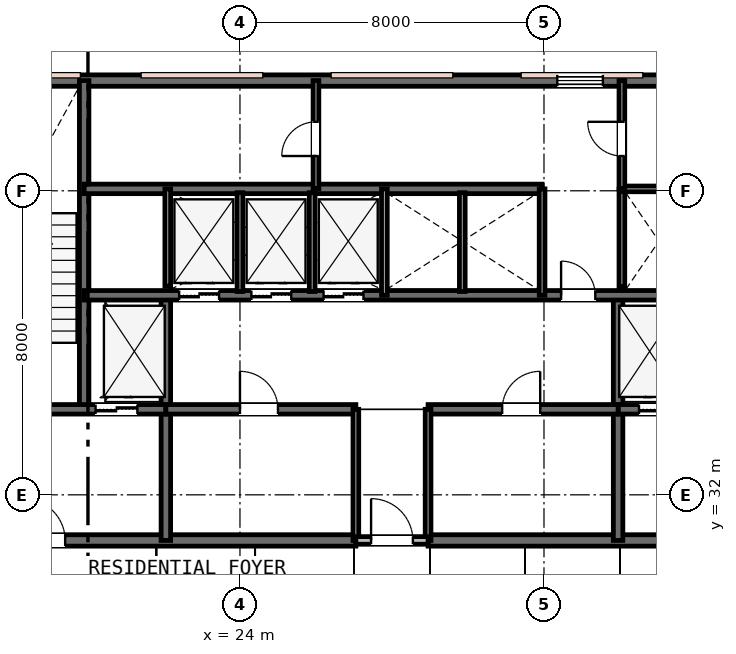
"""IFC4 building model, lengths in metres.
Left out: names, types, materials, properties, quantities, classifications, styles, units other than length and angle.
Written with IfcOpenShell. Run it as: python <this file> out.ifc"""

import sys

from ifc_helpers import new_model, si_unit, direction, frame, frame_2d, origin, place, context, subcontext, project, spatial, rectangle, extrude, element, fill, save


model = new_model("IFC4")
c1 = context("Model", 3, precision=1e-05, world=origin(), true_north=direction((0.0, 1.0)))
c2 = subcontext(c1, "Body", "Model", "MODEL_VIEW")
j1 = project(units=[si_unit("LENGTHUNIT", "METRE"), si_unit("PLANEANGLEUNIT", "RADIAN")], contexts=[c1])
p1 = place(None, origin())
s1 = spatial("IfcSite", under=j1, at=p1, CompositionType="ELEMENT")
p2 = place(p1, origin())
s2 = spatial("IfcBuilding", under=s1, at=p2, CompositionType="ELEMENT")
p3 = place(p2, frame((0.0, 0.0, 275.4)))
s3 = spatial("IfcBuildingStorey", under=s2, at=p3, CompositionType="ELEMENT", Elevation=275.4)
p4 = place(p3, frame((15.85, 42.9, 0.0), z_axis=(0.0, 0.0, 1.0), x_axis=(1.0, 0.0, 0.0)))
e1 = element("IfcWall", 1, at=p4, inside=s3, PredefinedType="SHEAR", context=c2, shape_type="SweptSolid", body=[
    extrude(rectangle(XDim=24.3, YDim=0.3, at=frame_2d((12.15, 0.0))), origin(), (0.0, 0.0, 1.0), 3.8),
])
p5 = place(p4, frame((1.6, 0.0, 0.95)))
e2 = element("IfcOpeningElement", 2, at=p5, cuts=e1, PredefinedType="OPENING", context=c2, shape_type="SweptSolid", body=[
    extrude(rectangle(XDim=1.2, YDim=1.6, at=frame_2d((0.6, 0.8))), frame((0.0, 0.16, 0.0), z_axis=(0.0, -1.0, 0.0), x_axis=(1.0, 0.0, 0.0)), (0.0, 0.0, 1.0), 0.32),
])
p6 = place(p4, frame((16.5, 0.0, 0.95)))
e3 = element("IfcOpeningElement", 3, at=p6, cuts=e1, PredefinedType="OPENING", context=c2, shape_type="SweptSolid", body=[
    extrude(rectangle(XDim=1.2, YDim=1.6, at=frame_2d((0.6, 0.8))), frame((0.0, 0.16, 0.0), z_axis=(0.0, -1.0, 0.0), x_axis=(1.0, 0.0, 0.0)), (0.0, 0.0, 1.0), 0.32),
])
p7 = place(p4, frame((21.6, 0.0, 0.95)))
e4 = element("IfcOpeningElement", 4, at=p7, cuts=e1, PredefinedType="OPENING", context=c2, shape_type="SweptSolid", body=[
    extrude(rectangle(XDim=1.2, YDim=1.6, at=frame_2d((0.6, 0.8))), frame((0.0, 0.16, 0.0), z_axis=(0.0, -1.0, 0.0), x_axis=(1.0, 0.0, 0.0)), (0.0, 0.0, 1.0), 0.32),
])
p8 = place(p3, frame((15.85, 30.8, 0.0), z_axis=(0.0, 0.0, 1.0), x_axis=(1.0, 0.0, 0.0)))
e5 = element("IfcWall", 5, at=p8, inside=s3, PredefinedType="SHEAR", context=c2, shape_type="SweptSolid", body=[
    extrude(rectangle(XDim=11.2, YDim=0.3, at=frame_2d((5.6, 0.0))), origin(), (0.0, 0.0, 1.0), 3.8),
])
p9 = place(p8, frame((2.45, 0.0, 0.0)))
e6 = element("IfcOpeningElement", 6, at=p9, cuts=e5, PredefinedType="OPENING", context=c2, shape_type="SweptSolid", body=[
    extrude(rectangle(XDim=1.1, YDim=2.15, at=frame_2d((0.55, 1.075))), frame((0.0, 0.16, 0.0), z_axis=(0.0, -1.0, 0.0), x_axis=(1.0, 0.0, 0.0)), (0.0, 0.0, 1.0), 0.32),
])
p10 = place(p3, frame((28.95, 30.8, 0.0), z_axis=(0.0, 0.0, 1.0), x_axis=(1.0, 0.0, 0.0)))
e7 = element("IfcWall", 7, at=p10, inside=s3, PredefinedType="SHEAR", context=c2, shape_type="SweptSolid", body=[
    extrude(rectangle(XDim=11.2, YDim=0.3, at=frame_2d((5.6, 0.0))), origin(), (0.0, 0.0, 1.0), 3.8),
])
p11 = place(p10, frame((7.65, 0.0, 0.0)))
e8 = element("IfcOpeningElement", 8, at=p11, cuts=e7, PredefinedType="OPENING", context=c2, shape_type="SweptSolid", body=[
    extrude(rectangle(XDim=1.1, YDim=2.15, at=frame_2d((0.55, 1.075))), frame((0.0, 0.16, 0.0), z_axis=(0.0, -1.0, 0.0), x_axis=(1.0, 0.0, 0.0)), (0.0, 0.0, 1.0), 0.32),
])
p12 = place(p3, frame((19.9, 34.25, 0.0), z_axis=(0.0, 0.0, 1.0), x_axis=(0.0, 1.0, 0.0)))
e9 = element("IfcWall", 9, at=p12, inside=s3, PredefinedType="SHEAR", context=c2, shape_type="SweptSolid", body=[
    extrude(rectangle(XDim=8.65, YDim=0.25, at=frame_2d((4.325, 0.0))), origin(), (0.0, 0.0, 1.0), 3.8),
])
for number, where, z_axis, x_axis in (
    (10, (22.05, 30.8, 0.0), (0.0, 0.0, 1.0), (0.0, 1.0, 0.0)),
    (11, (33.95, 30.8, 0.0), (0.0, 0.0, 1.0), (0.0, 1.0, 0.0)),
):
    element("IfcWall", number, at=place(p3, frame(where, z_axis=z_axis, x_axis=x_axis)), inside=s3, PredefinedType="SHEAR", context=c2, shape_type="SweptSolid", body=[
        extrude(rectangle(XDim=6.45, YDim=0.25, at=frame_2d((3.225, 0.0))), origin(), (0.0, 0.0, 1.0), 3.8),
    ])
p13 = place(p3, frame((16.0, 34.25, 0.0), z_axis=(0.0, 0.0, 1.0), x_axis=(1.0, 0.0, 0.0)))
e12 = element("IfcWall", 12, at=p13, inside=s3, PredefinedType="SHEAR", context=c2, shape_type="SweptSolid", body=[
    extrude(rectangle(XDim=6.05, YDim=0.25, at=frame_2d((3.025, 0.0))), origin(), (0.0, 0.0, 1.0), 3.8),
])
p14 = place(p13, frame((1.25, 0.0, 0.0)))
e13 = element("IfcOpeningElement", 13, at=p14, cuts=e12, PredefinedType="OPENING", context=c2, shape_type="SweptSolid", body=[
    extrude(rectangle(XDim=1.0, YDim=2.15, at=frame_2d((0.5, 1.075))), frame((0.0, 0.135, 0.0), z_axis=(0.0, -1.0, 0.0), x_axis=(1.0, 0.0, 0.0)), (0.0, 0.0, 1.0), 0.27),
])
p15 = place(p13, frame((4.2, 0.0, 0.0)))
e14 = element("IfcOpeningElement", 14, at=p15, cuts=e12, PredefinedType="OPENING", context=c2, shape_type="SweptSolid", body=[
    extrude(rectangle(XDim=1.1, YDim=2.15, at=frame_2d((0.55, 1.075))), frame((0.0, 0.135, 0.0), z_axis=(0.0, -1.0, 0.0), x_axis=(1.0, 0.0, 0.0)), (0.0, 0.0, 1.0), 0.27),
])
p16 = place(p3, frame((33.95, 34.25, 0.0), z_axis=(0.0, 0.0, 1.0), x_axis=(1.0, 0.0, 0.0)))
e15 = element("IfcWall", 15, at=p16, inside=s3, PredefinedType="SHEAR", context=c2, shape_type="SweptSolid", body=[
    extrude(rectangle(XDim=6.05, YDim=0.25, at=frame_2d((3.025, 0.0))), origin(), (0.0, 0.0, 1.0), 3.8),
])
p17 = place(p16, frame((3.7, 0.0, 0.0)))
e16 = element("IfcOpeningElement", 16, at=p17, cuts=e15, PredefinedType="OPENING", context=c2, shape_type="SweptSolid", body=[
    extrude(rectangle(XDim=1.0, YDim=2.15, at=frame_2d((0.5, 1.075))), frame((0.0, 0.135, 0.0), z_axis=(0.0, -1.0, 0.0), x_axis=(1.0, 0.0, 0.0)), (0.0, 0.0, 1.0), 0.27),
])
p18 = place(p16, frame((0.55, 0.0, 0.0)))
e17 = element("IfcOpeningElement", 17, at=p18, cuts=e15, PredefinedType="OPENING", context=c2, shape_type="SweptSolid", body=[
    extrude(rectangle(XDim=1.1, YDim=2.15, at=frame_2d((0.55, 1.075))), frame((0.0, 0.135, 0.0), z_axis=(0.0, -1.0, 0.0), x_axis=(1.0, 0.0, 0.0)), (0.0, 0.0, 1.0), 0.27),
])
p19 = place(p3, frame((22.05, 34.25, 0.0), z_axis=(0.0, 0.0, 1.0), x_axis=(1.0, 0.0, 0.0)))
e18 = element("IfcWall", 18, at=p19, inside=s3, PredefinedType="SHEAR", context=c2, shape_type="SweptSolid", body=[
    extrude(rectangle(XDim=5.0, YDim=0.25, at=frame_2d((2.5, 0.0))), origin(), (0.0, 0.0, 1.0), 3.8),
])
p20 = place(p19, frame((1.95, 0.0, 0.0)))
e19 = element("IfcOpeningElement", 19, at=p20, cuts=e18, PredefinedType="OPENING", context=c2, shape_type="SweptSolid", body=[
    extrude(rectangle(XDim=1.0, YDim=2.15, at=frame_2d((0.5, 1.075))), frame((0.0, 0.135, 0.0), z_axis=(0.0, -1.0, 0.0), x_axis=(1.0, 0.0, 0.0)), (0.0, 0.0, 1.0), 0.27),
])
p21 = place(p3, frame((28.95, 34.25, 0.0), z_axis=(0.0, 0.0, 1.0), x_axis=(1.0, 0.0, 0.0)))
e20 = element("IfcWall", 20, at=p21, inside=s3, PredefinedType="SHEAR", context=c2, shape_type="SweptSolid", body=[
    extrude(rectangle(XDim=5.0, YDim=0.25, at=frame_2d((2.5, 0.0))), origin(), (0.0, 0.0, 1.0), 3.8),
])
p22 = place(p21, frame((1.95, 0.0, 0.0)))
e21 = element("IfcOpeningElement", 21, at=p22, cuts=e20, PredefinedType="OPENING", context=c2, shape_type="SweptSolid", body=[
    extrude(rectangle(XDim=1.0, YDim=2.15, at=frame_2d((0.5, 1.075))), frame((0.0, 0.135, 0.0), z_axis=(0.0, -1.0, 0.0), x_axis=(1.0, 0.0, 0.0)), (0.0, 0.0, 1.0), 0.27),
])
p23 = place(p3, frame((19.9, 37.25, 0.0), z_axis=(0.0, 0.0, 1.0), x_axis=(1.0, 0.0, 0.0)))
e22 = element("IfcWall", 22, at=p23, inside=s3, PredefinedType="SHEAR", context=c2, shape_type="SweptSolid", body=[
    extrude(rectangle(XDim=16.2, YDim=0.25, at=frame_2d((8.1, 0.0))), origin(), (0.0, 0.0, 1.0), 3.8),
])
p24 = place(p23, frame((12.55, 0.0, 0.0)))
e23 = element("IfcOpeningElement", 23, at=p24, cuts=e22, PredefinedType="OPENING", context=c2, shape_type="SweptSolid", body=[
    extrude(rectangle(XDim=0.9, YDim=2.15, at=frame_2d((0.45, 1.075))), frame((0.0, 0.135, 0.0), z_axis=(0.0, -1.0, 0.0), x_axis=(1.0, 0.0, 0.0)), (0.0, 0.0, 1.0), 0.27),
])
p25 = place(p23, frame((2.5, 0.0, 0.0)))
e24 = element("IfcOpeningElement", 24, at=p25, cuts=e22, PredefinedType="OPENING", context=c2, shape_type="SweptSolid", body=[
    extrude(rectangle(XDim=1.05, YDim=2.15, at=frame_2d((0.525, 1.075))), frame((0.0, 0.135, 0.0), z_axis=(0.0, -1.0, 0.0), x_axis=(1.0, 0.0, 0.0)), (0.0, 0.0, 1.0), 0.27),
])
p26 = place(p23, frame((4.4, 0.0, 0.0)))
e25 = element("IfcOpeningElement", 25, at=p26, cuts=e22, PredefinedType="OPENING", context=c2, shape_type="SweptSolid", body=[
    extrude(rectangle(XDim=1.05, YDim=2.15, at=frame_2d((0.525, 1.075))), frame((0.0, 0.135, 0.0), z_axis=(0.0, -1.0, 0.0), x_axis=(1.0, 0.0, 0.0)), (0.0, 0.0, 1.0), 0.27),
])
p27 = place(p23, frame((6.3, 0.0, 0.0)))
e26 = element("IfcOpeningElement", 26, at=p27, cuts=e22, PredefinedType="OPENING", context=c2, shape_type="SweptSolid", body=[
    extrude(rectangle(XDim=1.05, YDim=2.15, at=frame_2d((0.525, 1.075))), frame((0.0, 0.135, 0.0), z_axis=(0.0, -1.0, 0.0), x_axis=(1.0, 0.0, 0.0)), (0.0, 0.0, 1.0), 0.27),
])
p28 = place(p3, frame((19.9, 40.05, 0.0), z_axis=(0.0, 0.0, 1.0), x_axis=(1.0, 0.0, 0.0)))
e27 = element("IfcWall", 27, at=p28, inside=s3, PredefinedType="SHEAR", context=c2, shape_type="SweptSolid", body=[
    extrude(rectangle(XDim=12.05, YDim=0.25, at=frame_2d((6.025, 0.0))), origin(), (0.0, 0.0, 1.0), 3.8),
])
for number, where, z_axis, x_axis in (
    (28, (27.05, 30.8, 0.0), (0.0, 0.0, 1.0), (0.0, 1.0, 0.0)),
    (29, (28.95, 30.8, 0.0), (0.0, 0.0, 1.0), (0.0, 1.0, 0.0)),
):
    element("IfcWall", number, at=place(p3, frame(where, z_axis=z_axis, x_axis=x_axis)), inside=s3, PredefinedType="PLUMBINGWALL", context=c2, shape_type="SweptSolid", body=[
        extrude(rectangle(XDim=3.45, YDim=0.15, at=frame_2d((1.725, 0.0))), origin(), (0.0, 0.0, 1.0), 3.28),
    ])
p29 = place(p3, frame((27.05, 30.8, 0.0), z_axis=(0.0, 0.0, 1.0), x_axis=(1.0, 0.0, 0.0)))
e30 = element("IfcWall", 30, at=p29, inside=s3, PredefinedType="PARTITIONING", context=c2, shape_type="SweptSolid", body=[
    extrude(rectangle(XDim=1.9, YDim=0.2, at=frame_2d((0.95, 0.0))), origin(), (0.0, 0.0, 1.0), 3.28),
])
p30 = place(p29, frame((0.4, 0.0, 0.0)))
e31 = element("IfcOpeningElement", 31, at=p30, cuts=e30, PredefinedType="OPENING", context=c2, shape_type="SweptSolid", body=[
    extrude(rectangle(XDim=1.1, YDim=2.15, at=frame_2d((0.55, 1.075))), frame((0.0, 0.11, 0.0), z_axis=(0.0, -1.0, 0.0), x_axis=(1.0, 0.0, 0.0)), (0.0, 0.0, 1.0), 0.22),
])
p31 = place(p3, frame((22.1, 37.49, 0.0), z_axis=(0.0, 0.0, 1.0), x_axis=(0.0, 1.0, 0.0)))
e32 = element("IfcWall", 32, at=p31, inside=s3, PredefinedType="PLUMBINGWALL", context=c2, shape_type="SweptSolid", body=[
    extrude(rectangle(XDim=2.56, YDim=0.15, at=frame_2d((1.28, 0.0))), origin(), (0.0, 0.0, 1.0), 3.53),
])
p32 = place(p3, frame((27.8, 37.25, 0.0), z_axis=(0.0, 0.0, 1.0), x_axis=(0.0, 1.0, 0.0)))
e33 = element("IfcWall", 33, at=p32, inside=s3, PredefinedType="PLUMBINGWALL", context=c2, shape_type="SweptSolid", body=[
    extrude(rectangle(XDim=2.8, YDim=0.15, at=frame_2d((1.4, 0.0))), origin(), (0.0, 0.0, 1.0), 3.53),
])
for number, where, z_axis, x_axis in (
    (34, (24.0, 37.35, 0.0), (0.0, 0.0, 1.0), (0.0, 1.0, 0.0)),
    (35, (25.9, 37.35, 0.0), (0.0, 0.0, 1.0), (0.0, 1.0, 0.0)),
):
    element("IfcWall", number, at=place(p3, frame(where, z_axis=z_axis, x_axis=x_axis)), inside=s3, PredefinedType="PLUMBINGWALL", context=c2, shape_type="SweptSolid", body=[
        extrude(rectangle(XDim=2.6, YDim=0.15, at=frame_2d((1.3, 0.0))), origin(), (0.0, 0.0, 1.0), 3.53),
    ])
p33 = place(p3, frame((31.95, 37.25, 0.0), z_axis=(0.0, 0.0, 1.0), x_axis=(0.0, 1.0, 0.0)))
e36 = element("IfcWall", 36, at=p33, inside=s3, PredefinedType="PLUMBINGWALL", context=c2, shape_type="SweptSolid", body=[
    extrude(rectangle(XDim=2.8, YDim=0.15, at=frame_2d((1.4, 0.0))), origin(), (0.0, 0.0, 1.0), 3.53),
])
p34 = place(p3, frame((29.85, 37.35, 0.0), z_axis=(0.0, 0.0, 1.0), x_axis=(0.0, 1.0, 0.0)))
e37 = element("IfcWall", 37, at=p34, inside=s3, PredefinedType="PLUMBINGWALL", context=c2, shape_type="SweptSolid", body=[
    extrude(rectangle(XDim=2.6, YDim=0.15, at=frame_2d((1.3, 0.0))), origin(), (0.0, 0.0, 1.0), 3.53),
])
p35 = place(p3, frame((34.05, 37.473, 0.0), z_axis=(0.0, 0.0, 1.0), x_axis=(0.0, 1.0, 0.0)))
e38 = element("IfcWall", 38, at=p35, inside=s3, PredefinedType="PLUMBINGWALL", context=c2, shape_type="SweptSolid", body=[
    extrude(rectangle(XDim=2.577, YDim=0.15, at=frame_2d((1.288, 0.0))), origin(), (0.0, 0.0, 1.0), 3.53),
])
p36 = place(p3, frame((34.05, 40.05, 0.0), z_axis=(0.0, 0.0, 1.0), x_axis=(1.0, 0.0, 0.0)))
e39 = element("IfcWall", 39, at=p36, inside=s3, PredefinedType="PARTITIONING", context=c2, shape_type="SweptSolid", body=[
    extrude(rectangle(XDim=2.05, YDim=0.15, at=frame_2d((1.025, 0.0))), origin(), (0.0, 0.0, 1.0), 3.53),
])
p37 = place(p3, frame((34.05, 40.05, 0.0), z_axis=(0.0, 0.0, 1.0), x_axis=(0.0, 1.0, 0.0)))
e40 = element("IfcWall", 40, at=p37, inside=s3, PredefinedType="PARTITIONING", context=c2, shape_type="SweptSolid", body=[
    extrude(rectangle(XDim=2.85, YDim=0.15, at=frame_2d((1.425, 0.0))), origin(), (0.0, 0.0, 1.0), 3.53),
])
p38 = place(p37, frame((0.865, 0.0, 0.0)))
e41 = element("IfcOpeningElement", 41, at=p38, cuts=e40, PredefinedType="OPENING", context=c2, shape_type="SweptSolid", body=[
    extrude(rectangle(XDim=0.9, YDim=2.15, at=frame_2d((0.45, 1.075))), frame((0.0, 0.085, 0.0), z_axis=(0.0, -1.0, 0.0), x_axis=(1.0, 0.0, 0.0)), (0.0, 0.0, 1.0), 0.17),
])
p39 = place(p3, frame((26.0, 40.05, 0.0), z_axis=(0.0, 0.0, 1.0), x_axis=(0.0, 1.0, 0.0)))
e42 = element("IfcWall", 42, at=p39, inside=s3, PredefinedType="PARTITIONING", context=c2, shape_type="SweptSolid", body=[
    extrude(rectangle(XDim=2.85, YDim=0.15, at=frame_2d((1.425, 0.0))), origin(), (0.0, 0.0, 1.0), 3.53),
])
p40 = place(p39, frame((0.865, 0.0, 0.0)))
e43 = element("IfcOpeningElement", 43, at=p40, cuts=e42, PredefinedType="OPENING", context=c2, shape_type="SweptSolid", body=[
    extrude(rectangle(XDim=0.9, YDim=2.15, at=frame_2d((0.45, 1.075))), frame((0.0, 0.085, 0.0), z_axis=(0.0, -1.0, 0.0), x_axis=(1.0, 0.0, 0.0)), (0.0, 0.0, 1.0), 0.17),
])
p41 = place(p6, origin())
e44 = element("IfcWindow", 44, at=p41, inside=s3, PartitioningType="SINGLE_PANEL", PredefinedType="WINDOW", context=c2, shape_type="SweptSolid", body=[
    extrude(rectangle(XDim=1.2, YDim=1.6, at=frame_2d((0.6, 0.8))), frame((0.0, 0.03, 0.0), z_axis=(0.0, -1.0, 0.0), x_axis=(1.0, 0.0, 0.0)), (0.0, 0.0, 1.0), 0.06),
])
fill(e3, e44)
p42 = place(p30, origin())
e45 = element("IfcDoor", 45, at=p42, inside=s3, OperationType="SINGLE_SWING_LEFT", PredefinedType="DOOR", context=c2, shape_type="SweptSolid", body=[
    extrude(rectangle(XDim=1.1, YDim=2.15, at=frame_2d((0.55, 1.075))), frame((0.0, 0.025, 0.0), z_axis=(0.0, -1.0, 0.0), x_axis=(1.0, 0.0, 0.0)), (0.0, 0.0, 1.0), 0.05),
])
fill(e31, e45)
p43 = place(p9, origin())
e46 = element("IfcDoor", 46, at=p43, inside=s3, OperationType="SINGLE_SWING_LEFT", PredefinedType="DOOR", context=c2, shape_type="SweptSolid", body=[
    extrude(rectangle(XDim=1.1, YDim=2.15, at=frame_2d((0.55, 1.075))), frame((0.0, 0.025, 0.0), z_axis=(0.0, -1.0, 0.0), x_axis=(1.0, 0.0, 0.0)), (0.0, 0.0, 1.0), 0.05),
])
fill(e6, e46)
p44 = place(p20, origin())
e47 = element("IfcDoor", 47, at=p44, inside=s3, OperationType="SINGLE_SWING_LEFT", PredefinedType="DOOR", context=c2, shape_type="SweptSolid", body=[
    extrude(rectangle(XDim=1.0, YDim=2.15, at=frame_2d((0.5, 1.075))), frame((0.0, 0.025, 0.0), z_axis=(0.0, -1.0, 0.0), x_axis=(1.0, 0.0, 0.0)), (0.0, 0.0, 1.0), 0.05),
])
fill(e19, e47)
p45 = place(p22, origin())
e48 = element("IfcDoor", 48, at=p45, inside=s3, OperationType="SINGLE_SWING_RIGHT", PredefinedType="DOOR", context=c2, shape_type="SweptSolid", body=[
    extrude(rectangle(XDim=1.0, YDim=2.15, at=frame_2d((0.5, 1.075))), frame((0.0, 0.025, 0.0), z_axis=(0.0, -1.0, 0.0), x_axis=(1.0, 0.0, 0.0)), (0.0, 0.0, 1.0), 0.05),
])
fill(e21, e48)
p46 = place(p24, origin())
e49 = element("IfcDoor", 49, at=p46, inside=s3, OperationType="SINGLE_SWING_LEFT", PredefinedType="DOOR", context=c2, shape_type="SweptSolid", body=[
    extrude(rectangle(XDim=0.9, YDim=2.15, at=frame_2d((0.45, 1.075))), frame((0.0, 0.025, 0.0), z_axis=(0.0, -1.0, 0.0), x_axis=(1.0, 0.0, 0.0)), (0.0, 0.0, 1.0), 0.05),
])
fill(e23, e49)
p47 = place(p38, origin())
e50 = element("IfcDoor", 50, at=p47, inside=s3, OperationType="SINGLE_SWING_RIGHT", PredefinedType="DOOR", context=c2, shape_type="SweptSolid", body=[
    extrude(rectangle(XDim=0.9, YDim=2.15, at=frame_2d((0.45, 1.075))), frame((0.0, 0.025, 0.0), z_axis=(0.0, -1.0, 0.0), x_axis=(1.0, 0.0, 0.0)), (0.0, 0.0, 1.0), 0.05),
])
fill(e41, e50)
p48 = place(p40, origin())
e51 = element("IfcDoor", 51, at=p48, inside=s3, OperationType="SINGLE_SWING_LEFT", PredefinedType="DOOR", context=c2, shape_type="SweptSolid", body=[
    extrude(rectangle(XDim=0.9, YDim=2.15, at=frame_2d((0.45, 1.075))), frame((0.0, 0.025, 0.0), z_axis=(0.0, -1.0, 0.0), x_axis=(1.0, 0.0, 0.0)), (0.0, 0.0, 1.0), 0.05),
])
fill(e43, e51)
p49 = place(p15, origin())
e52 = element("IfcDoor", 52, at=p49, inside=s3, OperationType="DOUBLE_DOOR_SLIDING", PredefinedType="DOOR", context=c2, shape_type="SweptSolid", body=[
    extrude(rectangle(XDim=1.1, YDim=2.15, at=frame_2d((0.55, 1.075))), frame((0.0, 0.025, 0.0), z_axis=(0.0, -1.0, 0.0), x_axis=(1.0, 0.0, 0.0)), (0.0, 0.0, 1.0), 0.05),
])
fill(e14, e52)
p50 = place(p18, origin())
e53 = element("IfcDoor", 53, at=p50, inside=s3, OperationType="DOUBLE_DOOR_SLIDING", PredefinedType="DOOR", context=c2, shape_type="SweptSolid", body=[
    extrude(rectangle(XDim=1.1, YDim=2.15, at=frame_2d((0.55, 1.075))), frame((0.0, 0.025, 0.0), z_axis=(0.0, -1.0, 0.0), x_axis=(1.0, 0.0, 0.0)), (0.0, 0.0, 1.0), 0.05),
])
fill(e17, e53)
p51 = place(p25, origin())
e54 = element("IfcDoor", 54, at=p51, inside=s3, OperationType="DOUBLE_DOOR_SLIDING", PredefinedType="DOOR", context=c2, shape_type="SweptSolid", body=[
    extrude(rectangle(XDim=1.05, YDim=2.15, at=frame_2d((0.525, 1.075))), frame((0.0, 0.025, 0.0), z_axis=(0.0, -1.0, 0.0), x_axis=(1.0, 0.0, 0.0)), (0.0, 0.0, 1.0), 0.05),
])
fill(e24, e54)
p52 = place(p26, origin())
e55 = element("IfcDoor", 55, at=p52, inside=s3, OperationType="DOUBLE_DOOR_SLIDING", PredefinedType="DOOR", context=c2, shape_type="SweptSolid", body=[
    extrude(rectangle(XDim=1.05, YDim=2.15, at=frame_2d((0.525, 1.075))), frame((0.0, 0.025, 0.0), z_axis=(0.0, -1.0, 0.0), x_axis=(1.0, 0.0, 0.0)), (0.0, 0.0, 1.0), 0.05),
])
fill(e25, e55)
p53 = place(p27, origin())
e56 = element("IfcDoor", 56, at=p53, inside=s3, OperationType="DOUBLE_DOOR_SLIDING", PredefinedType="DOOR", context=c2, shape_type="SweptSolid", body=[
    extrude(rectangle(XDim=1.05, YDim=2.15, at=frame_2d((0.525, 1.075))), frame((0.0, 0.025, 0.0), z_axis=(0.0, -1.0, 0.0), x_axis=(1.0, 0.0, 0.0)), (0.0, 0.0, 1.0), 0.05),
])
fill(e26, e56)
save(model, sys.argv[1])
